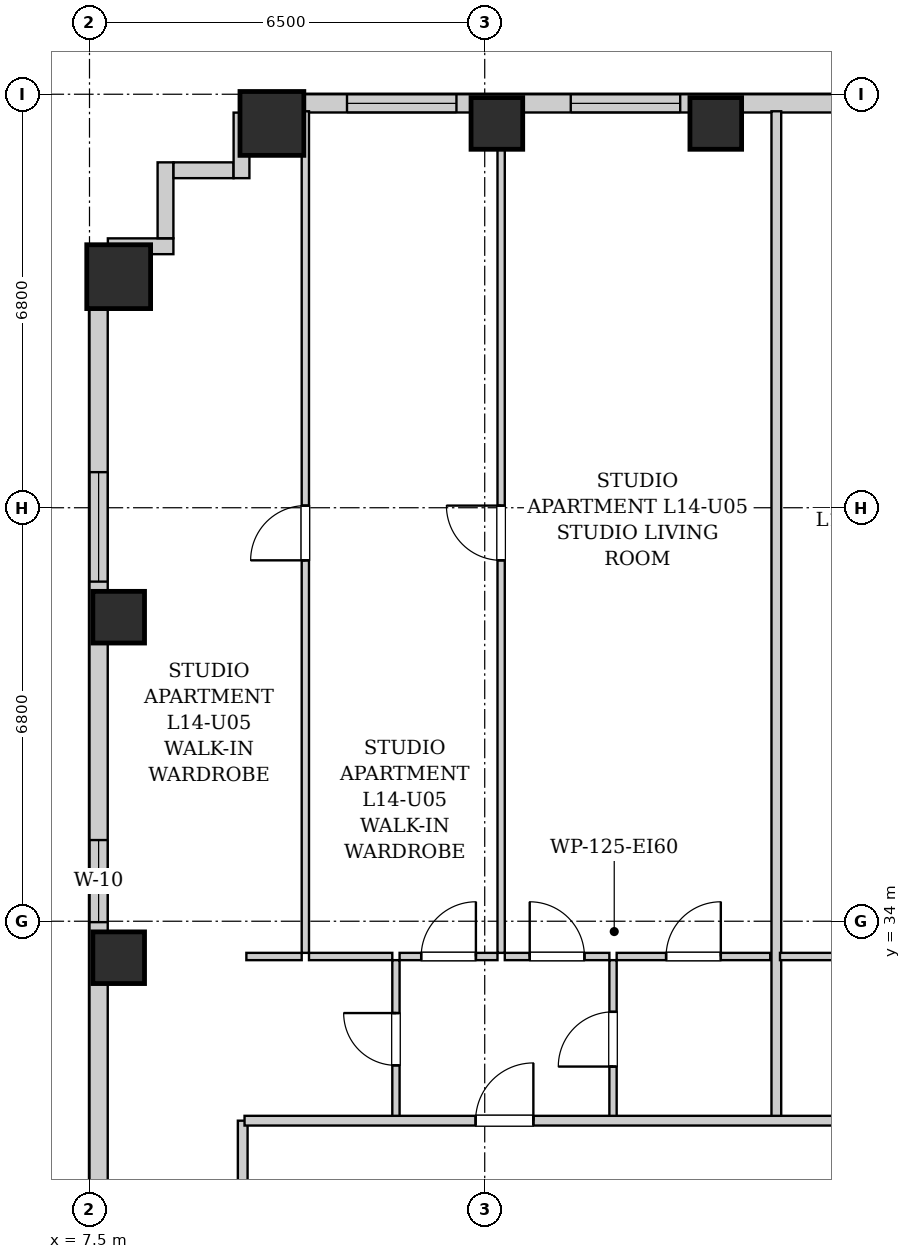
"""IFC4 building model, lengths in metres.
Left out: names, types, materials, properties, quantities, classifications, styles, units other than length and angle.
Written with IfcOpenShell. Run it as: python <this file> out.ifc"""

import sys

from ifc_helpers import new_model, si_unit, direction, frame, frame_2d, origin, origin_2d, place, context, subcontext, project, spatial, rectangle, extrude, element, fill, save


model = new_model("IFC4")
c1 = context("Model", 3, precision=1e-05, world=origin(), true_north=direction((0.0, 1.0)))
c2 = subcontext(c1, "Body", "Model", "MODEL_VIEW")
j1 = project(units=[si_unit("LENGTHUNIT", "METRE"), si_unit("PLANEANGLEUNIT", "RADIAN")], contexts=[c1])
p1 = place(None, origin())
s1 = spatial("IfcSite", under=j1, at=p1, CompositionType="ELEMENT")
p2 = place(p1, origin())
s2 = spatial("IfcBuilding", under=s1, at=p2, CompositionType="ELEMENT")
p3 = place(p2, frame((0.0, 0.0, 54.6)))
s3 = spatial("IfcBuildingStorey", under=s2, at=p3, CompositionType="ELEMENT", Elevation=54.6)
p4 = place(p3, frame((10.5, 47.12, 0.0), z_axis=(0.0, 0.0, 1.0), x_axis=(1.0, 0.0, 0.0)))
e1 = element("IfcColumn", 1, at=p4, inside=s3, PredefinedType="COLUMN", context=c2, shape_type="SweptSolid", body=[
    extrude(rectangle(XDim=1.05, YDim=1.05, at=origin_2d()), origin(), (0.0, 0.0, 1.0), 3.2),
])
for number, where, z_axis, x_axis in (
    (2, (14.2, 47.12, 0.0), (0.0, 0.0, 1.0), (1.0, 0.0, 0.0)),
    (3, (17.8, 47.12, 0.0), (0.0, 0.0, 1.0), (1.0, 0.0, 0.0)),
    (4, (7.98, 33.4, 0.0), (0.0, 0.0, 1.0), (1.0, 0.0, 0.0)),
    (5, (7.98, 39.0, 0.0), (0.0, 0.0, 1.0), (1.0, 0.0, 0.0)),
):
    element("IfcColumn", number, at=place(p3, frame(where, z_axis=z_axis, x_axis=x_axis)), inside=s3, PredefinedType="COLUMN", context=c2, shape_type="SweptSolid", body=[
        extrude(rectangle(XDim=0.85, YDim=0.85, at=origin_2d()), origin(), (0.0, 0.0, 1.0), 3.2),
    ])
p5 = place(p3, frame((7.98, 44.6, 0.0), z_axis=(0.0, 0.0, 1.0), x_axis=(1.0, 0.0, 0.0)))
e6 = element("IfcColumn", 6, at=p5, inside=s3, PredefinedType="COLUMN", context=c2, shape_type="SweptSolid", body=[
    extrude(rectangle(XDim=1.05, YDim=1.05, at=origin_2d()), origin(), (0.0, 0.0, 1.0), 3.2),
])
p6 = place(p3, frame((10.0, 47.45, 0.0), z_axis=(0.0, 0.0, 1.0), x_axis=(1.0, 0.0, 0.0)))
e7 = element("IfcWall", 7, at=p6, inside=s3, PredefinedType="SOLIDWALL", context=c2, shape_type="SweptSolid", body=[
    extrude(rectangle(XDim=27.55, YDim=0.3, at=frame_2d((13.775, 0.0))), origin(), (0.0, 0.0, 1.0), 1.975),
])
p7 = place(p6, frame((1.735, 0.0, 0.55)))
e8 = element("IfcOpeningElement", 8, at=p7, cuts=e7, PredefinedType="OPENING", context=c2, shape_type="SweptSolid", body=[
    extrude(rectangle(XDim=1.8, YDim=1.2, at=frame_2d((0.9, 0.6))), frame((0.0, 0.16, 0.0), z_axis=(0.0, -1.0, 0.0), x_axis=(1.0, 0.0, 0.0)), (0.0, 0.0, 1.0), 0.32),
])
p8 = place(p6, frame((5.415, 0.0, 0.55)))
e9 = element("IfcOpeningElement", 9, at=p8, cuts=e7, PredefinedType="OPENING", context=c2, shape_type="SweptSolid", body=[
    extrude(rectangle(XDim=1.8, YDim=1.2, at=frame_2d((0.9, 0.6))), frame((0.0, 0.16, 0.0), z_axis=(0.0, -1.0, 0.0), x_axis=(1.0, 0.0, 0.0)), (0.0, 0.0, 1.0), 0.32),
])
p9 = place(p6, frame((10.617, 0.0, 0.55)))
e10 = element("IfcOpeningElement", 10, at=p9, cuts=e7, PredefinedType="OPENING", context=c2, shape_type="SweptSolid", body=[
    extrude(rectangle(XDim=1.8, YDim=1.2, at=frame_2d((0.9, 0.6))), frame((0.0, 0.16, 0.0), z_axis=(0.0, -1.0, 0.0), x_axis=(1.0, 0.0, 0.0)), (0.0, 0.0, 1.0), 0.32),
])
p10 = place(p6, frame((17.5, 0.0, 0.55)))
e11 = element("IfcOpeningElement", 11, at=p10, cuts=e7, PredefinedType="OPENING", context=c2, shape_type="SweptSolid", body=[
    extrude(rectangle(XDim=0.85, YDim=1.2, at=frame_2d((0.425, 0.6))), frame((0.0, 0.16, 0.0), z_axis=(0.0, -1.0, 0.0), x_axis=(1.0, 0.0, 0.0)), (0.0, 0.0, 1.0), 0.32),
])
p11 = place(p6, frame((19.349, 0.0, 0.55)))
e12 = element("IfcOpeningElement", 12, at=p11, cuts=e7, PredefinedType="OPENING", context=c2, shape_type="SweptSolid", body=[
    extrude(rectangle(XDim=1.8, YDim=1.2, at=frame_2d((0.9, 0.6))), frame((0.0, 0.16, 0.0), z_axis=(0.0, -1.0, 0.0), x_axis=(1.0, 0.0, 0.0)), (0.0, 0.0, 1.0), 0.32),
])
p12 = place(p6, frame((24.769, 0.0, 0.55)))
e13 = element("IfcOpeningElement", 13, at=p12, cuts=e7, PredefinedType="OPENING", context=c2, shape_type="SweptSolid", body=[
    extrude(rectangle(XDim=1.8, YDim=1.2, at=frame_2d((0.9, 0.6))), frame((0.0, 0.16, 0.0), z_axis=(0.0, -1.0, 0.0), x_axis=(1.0, 0.0, 0.0)), (0.0, 0.0, 1.0), 0.32),
])
p13 = place(p3, frame((7.65, 19.4, 0.0), z_axis=(0.0, 0.0, 1.0), x_axis=(0.0, 1.0, 0.0)))
e14 = element("IfcWall", 14, at=p13, inside=s3, PredefinedType="SOLIDWALL", context=c2, shape_type="SweptSolid", body=[
    extrude(rectangle(XDim=25.7, YDim=0.3, at=frame_2d((12.85, 0.0))), origin(), (0.0, 0.0, 1.0), 1.975),
])
p14 = place(p13, frame((20.185, 0.0, 0.55)))
e15 = element("IfcOpeningElement", 15, at=p14, cuts=e14, PredefinedType="OPENING", context=c2, shape_type="SweptSolid", body=[
    extrude(rectangle(XDim=1.8, YDim=1.2, at=frame_2d((0.9, 0.6))), frame((0.0, 0.16, 0.0), z_axis=(0.0, -1.0, 0.0), x_axis=(1.0, 0.0, 0.0)), (0.0, 0.0, 1.0), 0.32),
])
p15 = place(p13, frame((14.585, 0.0, 0.55)))
e16 = element("IfcOpeningElement", 16, at=p15, cuts=e14, PredefinedType="OPENING", context=c2, shape_type="SweptSolid", body=[
    extrude(rectangle(XDim=1.35, YDim=1.2, at=frame_2d((0.675, 0.6))), frame((0.0, 0.16, 0.0), z_axis=(0.0, -1.0, 0.0), x_axis=(1.0, 0.0, 0.0)), (0.0, 0.0, 1.0), 0.32),
])
p16 = place(p13, frame((5.1, 0.0, 0.55)))
e17 = element("IfcOpeningElement", 17, at=p16, cuts=e14, PredefinedType="OPENING", context=c2, shape_type="SweptSolid", body=[
    extrude(rectangle(XDim=1.8, YDim=1.2, at=frame_2d((0.9, 0.6))), frame((0.0, 0.16, 0.0), z_axis=(0.0, -1.0, 0.0), x_axis=(1.0, 0.0, 0.0)), (0.0, 0.0, 1.0), 0.32),
])
p17 = place(p13, frame((7.16, 0.0, 0.55)))
e18 = element("IfcOpeningElement", 18, at=p17, cuts=e14, PredefinedType="OPENING", context=c2, shape_type="SweptSolid", body=[
    extrude(rectangle(XDim=1.35, YDim=1.2, at=frame_2d((0.675, 0.6))), frame((0.0, 0.16, 0.0), z_axis=(0.0, -1.0, 0.0), x_axis=(1.0, 0.0, 0.0)), (0.0, 0.0, 1.0), 0.32),
])
p18 = place(p3, frame((7.802, 45.1, 0.0), z_axis=(0.0, 0.0, 1.0), x_axis=(1.0, 0.0, 0.0)))
e19 = element("IfcWall", 19, at=p18, inside=s3, PredefinedType="SOLIDWALL", context=c2, shape_type="SweptSolid", body=[
    extrude(rectangle(XDim=1.078, YDim=0.26, at=frame_2d((0.539, 0.0))), origin(), (0.0, 0.0, 1.0), 2.94),
])
p19 = place(p3, frame((8.75, 45.232, 0.0), z_axis=(0.0, 0.0, 1.0), x_axis=(0.0, 1.0, 0.0)))
e20 = element("IfcWall", 20, at=p19, inside=s3, PredefinedType="SOLIDWALL", context=c2, shape_type="SweptSolid", body=[
    extrude(rectangle(XDim=1.248, YDim=0.26, at=frame_2d((0.624, 0.0))), origin(), (0.0, 0.0, 1.0), 2.94),
])
p20 = place(p3, frame((8.882, 46.35, 0.0), z_axis=(0.0, 0.0, 1.0), x_axis=(1.0, 0.0, 0.0)))
e21 = element("IfcWall", 21, at=p20, inside=s3, PredefinedType="SOLIDWALL", context=c2, shape_type="SweptSolid", body=[
    extrude(rectangle(XDim=0.986, YDim=0.26, at=frame_2d((0.493, 0.0))), origin(), (0.0, 0.0, 1.0), 2.94),
])
p21 = place(p3, frame((10.0, 46.22, 0.0), z_axis=(0.0, 0.0, 1.0), x_axis=(0.0, 1.0, 0.0)))
e22 = element("IfcWall", 22, at=p21, inside=s3, PredefinedType="SOLIDWALL", context=c2, shape_type="SweptSolid", body=[
    extrude(rectangle(XDim=1.078, YDim=0.26, at=frame_2d((0.539, 0.0))), origin(), (0.0, 0.0, 1.0), 2.94),
])
p22 = place(p3, frame((10.02, 28.98, 0.0), z_axis=(0.0, 0.0, 1.0), x_axis=(0.0, 1.0, 0.0)))
e23 = element("IfcWall", 23, at=p22, inside=s3, PredefinedType="PARTITIONING", context=c2, shape_type="SweptSolid", body=[
    extrude(rectangle(XDim=1.74, YDim=0.16, at=frame_2d((0.87, 0.0))), origin(), (0.0, 0.0, 1.0), 2.94),
])
p23 = place(p3, frame((12.54, 30.76, 0.0), z_axis=(0.0, 0.0, 1.0), x_axis=(0.0, 1.0, 0.0)))
e24 = element("IfcWall", 24, at=p23, inside=s3, PredefinedType="PARTITIONING", context=c2, shape_type="SweptSolid", body=[
    extrude(rectangle(XDim=2.6, YDim=0.12, at=frame_2d((1.3, 0.0))), origin(), (0.0, 0.0, 1.0), 2.94),
])
p24 = place(p23, frame((0.87, 0.0, 0.0)))
e25 = element("IfcOpeningElement", 25, at=p24, cuts=e24, PredefinedType="OPENING", context=c2, shape_type="SweptSolid", body=[
    extrude(rectangle(XDim=0.86, YDim=2.05, at=frame_2d((0.43, 1.025))), frame((0.0, 0.07, 0.0), z_axis=(0.0, -1.0, 0.0), x_axis=(1.0, 0.0, 0.0)), (0.0, 0.0, 1.0), 0.14),
])
p25 = place(p3, frame((10.08, 33.42, 0.0), z_axis=(0.0, 0.0, 1.0), x_axis=(1.0, 0.0, 0.0)))
e26 = element("IfcWall", 26, at=p25, inside=s3, PredefinedType="PARTITIONING", context=c2, shape_type="SweptSolid", body=[
    extrude(rectangle(XDim=0.91, YDim=0.12, at=frame_2d((0.455, 0.0))), origin(), (0.0, 0.0, 1.0), 2.94),
])
p26 = place(p3, frame((11.11, 33.42, 0.0), z_axis=(0.0, 0.0, 1.0), x_axis=(1.0, 0.0, 0.0)))
e27 = element("IfcWall", 27, at=p26, inside=s3, PredefinedType="PARTITIONING", context=c2, shape_type="SweptSolid", body=[
    extrude(rectangle(XDim=1.37, YDim=0.12, at=frame_2d((0.685, 0.0))), origin(), (0.0, 0.0, 1.0), 2.94),
])
p27 = place(p3, frame((16.11, 30.76, 0.0), z_axis=(0.0, 0.0, 1.0), x_axis=(0.0, 1.0, 0.0)))
e28 = element("IfcWall", 28, at=p27, inside=s3, PredefinedType="PARTITIONING", context=c2, shape_type="SweptSolid", body=[
    extrude(rectangle(XDim=2.6, YDim=0.12, at=frame_2d((1.3, 0.0))), origin(), (0.0, 0.0, 1.0), 2.94),
])
p28 = place(p27, frame((0.85, 0.0, 0.0)))
e29 = element("IfcOpeningElement", 29, at=p28, cuts=e28, PredefinedType="OPENING", context=c2, shape_type="SweptSolid", body=[
    extrude(rectangle(XDim=0.9, YDim=2.05, at=frame_2d((0.45, 1.025))), frame((0.0, 0.07, 0.0), z_axis=(0.0, -1.0, 0.0), x_axis=(1.0, 0.0, 0.0)), (0.0, 0.0, 1.0), 0.14),
])
p29 = place(p3, frame((12.6, 33.42, 0.0), z_axis=(0.0, 0.0, 1.0), x_axis=(1.0, 0.0, 0.0)))
e30 = element("IfcWall", 30, at=p29, inside=s3, PredefinedType="PARTITIONING", context=c2, shape_type="SweptSolid", body=[
    extrude(rectangle(XDim=1.61, YDim=0.12, at=frame_2d((0.805, 0.0))), origin(), (0.0, 0.0, 1.0), 2.94),
])
p30 = place(p29, frame((0.355, 0.0, 0.0)))
e31 = element("IfcOpeningElement", 31, at=p30, cuts=e30, PredefinedType="OPENING", context=c2, shape_type="SweptSolid", body=[
    extrude(rectangle(XDim=0.9, YDim=2.05, at=frame_2d((0.45, 1.025))), frame((0.0, 0.07, 0.0), z_axis=(0.0, -1.0, 0.0), x_axis=(1.0, 0.0, 0.0)), (0.0, 0.0, 1.0), 0.14),
])
p31 = place(p3, frame((14.33, 33.42, 0.0), z_axis=(0.0, 0.0, 1.0), x_axis=(1.0, 0.0, 0.0)))
e32 = element("IfcWall", 32, at=p31, inside=s3, PredefinedType="PARTITIONING", context=c2, shape_type="SweptSolid", body=[
    extrude(rectangle(XDim=1.72, YDim=0.12, at=frame_2d((0.86, 0.0))), origin(), (0.0, 0.0, 1.0), 2.94),
])
p32 = place(p31, frame((0.41, 0.0, 0.0)))
e33 = element("IfcOpeningElement", 33, at=p32, cuts=e32, PredefinedType="OPENING", context=c2, shape_type="SweptSolid", body=[
    extrude(rectangle(XDim=0.9, YDim=2.05, at=frame_2d((0.45, 1.025))), frame((0.0, 0.07, 0.0), z_axis=(0.0, -1.0, 0.0), x_axis=(1.0, 0.0, 0.0)), (0.0, 0.0, 1.0), 0.14),
])
p33 = place(p3, frame((16.17, 33.42, 0.0), z_axis=(0.0, 0.0, 1.0), x_axis=(1.0, 0.0, 0.0)))
e34 = element("IfcWall", 34, at=p33, inside=s3, PredefinedType="PARTITIONING", context=c2, shape_type="SweptSolid", body=[
    extrude(rectangle(XDim=2.526, YDim=0.12, at=frame_2d((1.263, 0.0))), origin(), (0.0, 0.0, 1.0), 2.94),
])
p34 = place(p33, frame((0.813, 0.0, 0.0)))
e35 = element("IfcOpeningElement", 35, at=p34, cuts=e34, PredefinedType="OPENING", context=c2, shape_type="SweptSolid", body=[
    extrude(rectangle(XDim=0.9, YDim=2.05, at=frame_2d((0.45, 1.025))), frame((0.0, 0.07, 0.0), z_axis=(0.0, -1.0, 0.0), x_axis=(1.0, 0.0, 0.0)), (0.0, 0.0, 1.0), 0.14),
])
p35 = place(p3, frame((11.05, 33.48, 0.0), z_axis=(0.0, 0.0, 1.0), x_axis=(0.0, 1.0, 0.0)))
e36 = element("IfcWall", 36, at=p35, inside=s3, PredefinedType="PARTITIONING", context=c2, shape_type="SweptSolid", body=[
    extrude(rectangle(XDim=13.84, YDim=0.12, at=frame_2d((6.92, 0.0))), origin(), (0.0, 0.0, 1.0), 2.94),
])
p36 = place(p35, frame((6.455, 0.0, 0.0)))
e37 = element("IfcOpeningElement", 37, at=p36, cuts=e36, PredefinedType="OPENING", context=c2, shape_type="SweptSolid", body=[
    extrude(rectangle(XDim=0.9, YDim=2.05, at=frame_2d((0.45, 1.025))), frame((0.0, 0.07, 0.0), z_axis=(0.0, -1.0, 0.0), x_axis=(1.0, 0.0, 0.0)), (0.0, 0.0, 1.0), 0.14),
])
p37 = place(p3, frame((14.27, 33.48, 0.0), z_axis=(0.0, 0.0, 1.0), x_axis=(0.0, 1.0, 0.0)))
e38 = element("IfcWall", 38, at=p37, inside=s3, PredefinedType="PARTITIONING", context=c2, shape_type="SweptSolid", body=[
    extrude(rectangle(XDim=13.84, YDim=0.12, at=frame_2d((6.92, 0.0))), origin(), (0.0, 0.0, 1.0), 2.94),
])
p38 = place(p37, frame((6.455, 0.0, 0.0)))
e39 = element("IfcOpeningElement", 39, at=p38, cuts=e38, PredefinedType="OPENING", context=c2, shape_type="SweptSolid", body=[
    extrude(rectangle(XDim=0.9, YDim=2.05, at=frame_2d((0.45, 1.025))), frame((0.0, 0.07, 0.0), z_axis=(0.0, -1.0, 0.0), x_axis=(1.0, 0.0, 0.0)), (0.0, 0.0, 1.0), 0.14),
])
p39 = place(p3, frame((18.796, 30.76, 0.0), z_axis=(0.0, 0.0, 1.0), x_axis=(0.0, 1.0, 0.0)))
e40 = element("IfcWall", 40, at=p39, inside=s3, PredefinedType="PARTITIONING", context=c2, shape_type="SweptSolid", body=[
    extrude(rectangle(XDim=16.56, YDim=0.16, at=frame_2d((8.28, 0.0))), origin(), (0.0, 0.0, 1.0), 2.94),
])
p40 = place(p3, frame((18.856, 33.42, 0.0), z_axis=(0.0, 0.0, 1.0), x_axis=(1.0, 0.0, 0.0)))
e41 = element("IfcWall", 41, at=p40, inside=s3, PredefinedType="PARTITIONING", context=c2, shape_type="SweptSolid", body=[
    extrude(rectangle(XDim=1.85, YDim=0.12, at=frame_2d((0.925, 0.0))), origin(), (0.0, 0.0, 1.0), 2.94),
])
p41 = place(p3, frame((10.05, 30.72, 0.0), z_axis=(0.0, 0.0, 1.0), x_axis=(1.0, 0.0, 0.0)))
e42 = element("IfcWall", 42, at=p41, inside=s3, PredefinedType="PARTITIONING", context=c2, shape_type="SweptSolid", body=[
    extrude(rectangle(XDim=33.9, YDim=0.16, at=frame_2d((16.95, 0.0))), origin(), (0.0, 0.0, 1.0), 2.94),
])
p42 = place(p41, frame((3.8, 0.0, 0.0)))
e43 = element("IfcOpeningElement", 43, at=p42, cuts=e42, PredefinedType="OPENING", context=c2, shape_type="SweptSolid", body=[
    extrude(rectangle(XDim=0.95, YDim=2.1, at=frame_2d((0.475, 1.05))), frame((0.0, 0.09, 0.0), z_axis=(0.0, -1.0, 0.0), x_axis=(1.0, 0.0, 0.0)), (0.0, 0.0, 1.0), 0.18),
])
p43 = place(p41, frame((11.977, 0.0, 0.0)))
e44 = element("IfcOpeningElement", 44, at=p43, cuts=e42, PredefinedType="OPENING", context=c2, shape_type="SweptSolid", body=[
    extrude(rectangle(XDim=0.95, YDim=2.1, at=frame_2d((0.475, 1.05))), frame((0.0, 0.09, 0.0), z_axis=(0.0, -1.0, 0.0), x_axis=(1.0, 0.0, 0.0)), (0.0, 0.0, 1.0), 0.18),
])
p44 = place(p41, frame((18.09, 0.0, 0.0)))
e45 = element("IfcOpeningElement", 45, at=p44, cuts=e42, PredefinedType="OPENING", context=c2, shape_type="SweptSolid", body=[
    extrude(rectangle(XDim=0.95, YDim=2.1, at=frame_2d((0.475, 1.05))), frame((0.0, 0.09, 0.0), z_axis=(0.0, -1.0, 0.0), x_axis=(1.0, 0.0, 0.0)), (0.0, 0.0, 1.0), 0.18),
])
p45 = place(p41, frame((30.956, 0.0, 0.0)))
e46 = element("IfcOpeningElement", 46, at=p45, cuts=e42, PredefinedType="OPENING", context=c2, shape_type="SweptSolid", body=[
    extrude(rectangle(XDim=0.95, YDim=2.1, at=frame_2d((0.475, 1.05))), frame((0.0, 0.09, 0.0), z_axis=(0.0, -1.0, 0.0), x_axis=(1.0, 0.0, 0.0)), (0.0, 0.0, 1.0), 0.18),
])
p46 = place(p24, origin())
e47 = element("IfcDoor", 47, at=p46, inside=s3, OperationType="SINGLE_SWING_RIGHT", PredefinedType="DOOR", context=c2, shape_type="SweptSolid", body=[
    extrude(rectangle(XDim=0.86, YDim=2.05, at=frame_2d((0.43, 1.025))), frame((0.0, 0.025, 0.0), z_axis=(0.0, -1.0, 0.0), x_axis=(1.0, 0.0, 0.0)), (0.0, 0.0, 1.0), 0.05),
])
fill(e25, e47)
p47 = place(p28, origin())
e48 = element("IfcDoor", 48, at=p47, inside=s3, OperationType="SINGLE_SWING_LEFT", PredefinedType="DOOR", context=c2, shape_type="SweptSolid", body=[
    extrude(rectangle(XDim=0.9, YDim=2.05, at=frame_2d((0.45, 1.025))), frame((0.0, 0.025, 0.0), z_axis=(0.0, -1.0, 0.0), x_axis=(1.0, 0.0, 0.0)), (0.0, 0.0, 1.0), 0.05),
])
fill(e29, e48)
p48 = place(p30, origin())
e49 = element("IfcDoor", 49, at=p48, inside=s3, OperationType="SINGLE_SWING_RIGHT", PredefinedType="DOOR", context=c2, shape_type="SweptSolid", body=[
    extrude(rectangle(XDim=0.9, YDim=2.05, at=frame_2d((0.45, 1.025))), frame((0.0, 0.025, 0.0), z_axis=(0.0, -1.0, 0.0), x_axis=(1.0, 0.0, 0.0)), (0.0, 0.0, 1.0), 0.05),
])
fill(e31, e49)
p49 = place(p32, origin())
e50 = element("IfcDoor", 50, at=p49, inside=s3, OperationType="SINGLE_SWING_LEFT", PredefinedType="DOOR", context=c2, shape_type="SweptSolid", body=[
    extrude(rectangle(XDim=0.9, YDim=2.05, at=frame_2d((0.45, 1.025))), frame((0.0, 0.025, 0.0), z_axis=(0.0, -1.0, 0.0), x_axis=(1.0, 0.0, 0.0)), (0.0, 0.0, 1.0), 0.05),
])
fill(e33, e50)
p50 = place(p34, origin())
e51 = element("IfcDoor", 51, at=p50, inside=s3, OperationType="SINGLE_SWING_RIGHT", PredefinedType="DOOR", context=c2, shape_type="SweptSolid", body=[
    extrude(rectangle(XDim=0.9, YDim=2.05, at=frame_2d((0.45, 1.025))), frame((0.0, 0.025, 0.0), z_axis=(0.0, -1.0, 0.0), x_axis=(1.0, 0.0, 0.0)), (0.0, 0.0, 1.0), 0.05),
])
fill(e35, e51)
p51 = place(p36, origin())
e52 = element("IfcDoor", 52, at=p51, inside=s3, OperationType="SINGLE_SWING_LEFT", PredefinedType="DOOR", context=c2, shape_type="SweptSolid", body=[
    extrude(rectangle(XDim=0.9, YDim=2.05, at=frame_2d((0.45, 1.025))), frame((0.0, 0.025, 0.0), z_axis=(0.0, -1.0, 0.0), x_axis=(1.0, 0.0, 0.0)), (0.0, 0.0, 1.0), 0.05),
])
fill(e37, e52)
p52 = place(p38, origin())
e53 = element("IfcDoor", 53, at=p52, inside=s3, OperationType="SINGLE_SWING_RIGHT", PredefinedType="DOOR", context=c2, shape_type="SweptSolid", body=[
    extrude(rectangle(XDim=0.9, YDim=2.05, at=frame_2d((0.45, 1.025))), frame((0.0, 0.025, 0.0), z_axis=(0.0, -1.0, 0.0), x_axis=(1.0, 0.0, 0.0)), (0.0, 0.0, 1.0), 0.05),
])
fill(e39, e53)
p53 = place(p42, origin())
e54 = element("IfcDoor", 54, at=p53, inside=s3, OperationType="SINGLE_SWING_RIGHT", PredefinedType="DOOR", context=c2, shape_type="SweptSolid", body=[
    extrude(rectangle(XDim=0.95, YDim=2.1, at=frame_2d((0.475, 1.05))), frame((0.0, 0.025, 0.0), z_axis=(0.0, -1.0, 0.0), x_axis=(1.0, 0.0, 0.0)), (0.0, 0.0, 1.0), 0.05),
])
fill(e43, e54)
p54 = place(p14, origin())
e55 = element("IfcWindow", 55, at=p54, inside=s3, PartitioningType="DOUBLE_PANEL_VERTICAL", PredefinedType="WINDOW", context=c2, shape_type="SweptSolid", body=[
    extrude(rectangle(XDim=1.8, YDim=1.2, at=frame_2d((0.9, 0.6))), frame((0.0, 0.03, 0.0), z_axis=(0.0, -1.0, 0.0), x_axis=(1.0, 0.0, 0.0)), (0.0, 0.0, 1.0), 0.06),
])
fill(e15, e55)
p55 = place(p15, origin())
e56 = element("IfcWindow", 56, at=p55, inside=s3, PartitioningType="SINGLE_PANEL", PredefinedType="WINDOW", context=c2, shape_type="SweptSolid", body=[
    extrude(rectangle(XDim=1.35, YDim=1.2, at=frame_2d((0.675, 0.6))), frame((0.0, 0.03, 0.0), z_axis=(0.0, -1.0, 0.0), x_axis=(1.0, 0.0, 0.0)), (0.0, 0.0, 1.0), 0.06),
])
fill(e16, e56)
p56 = place(p7, origin())
e57 = element("IfcWindow", 57, at=p56, inside=s3, PartitioningType="DOUBLE_PANEL_VERTICAL", PredefinedType="WINDOW", context=c2, shape_type="SweptSolid", body=[
    extrude(rectangle(XDim=1.8, YDim=1.2, at=frame_2d((0.9, 0.6))), frame((0.0, 0.03, 0.0), z_axis=(0.0, -1.0, 0.0), x_axis=(1.0, 0.0, 0.0)), (0.0, 0.0, 1.0), 0.06),
])
fill(e8, e57)
p57 = place(p8, origin())
e58 = element("IfcWindow", 58, at=p57, inside=s3, PartitioningType="DOUBLE_PANEL_VERTICAL", PredefinedType="WINDOW", context=c2, shape_type="SweptSolid", body=[
    extrude(rectangle(XDim=1.8, YDim=1.2, at=frame_2d((0.9, 0.6))), frame((0.0, 0.03, 0.0), z_axis=(0.0, -1.0, 0.0), x_axis=(1.0, 0.0, 0.0)), (0.0, 0.0, 1.0), 0.06),
])
fill(e9, e58)
save(model, sys.argv[1])
